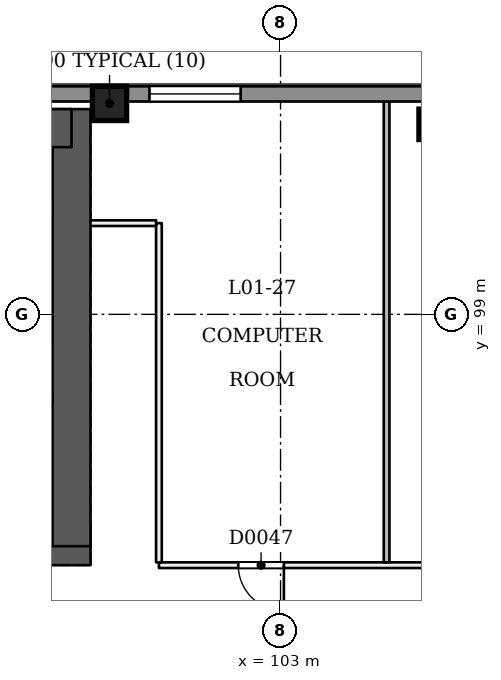
"""IFC4 building model, lengths in metres.
Left out: names, types, materials, properties, quantities, classifications, styles, units other than length and angle.
Written with IfcOpenShell. Run it as: python <this file> out.ifc"""

import sys

from ifc_helpers import new_model, si_unit, direction, frame, frame_2d, origin, origin_2d, place, context, subcontext, project, spatial, rectangle, extrude, element, fill, save


model = new_model("IFC4")
c1 = context("Model", 3, precision=1e-05, world=origin(), true_north=direction((0.0, 1.0)))
c2 = subcontext(c1, "Body", "Model", "MODEL_VIEW")
j1 = project(units=[si_unit("LENGTHUNIT", "METRE"), si_unit("PLANEANGLEUNIT", "RADIAN")], contexts=[c1])
p1 = place(None, origin())
s1 = spatial("IfcSite", under=j1, at=p1, CompositionType="ELEMENT")
p2 = place(p1, origin())
s2 = spatial("IfcBuilding", under=s1, at=p2, CompositionType="ELEMENT")
p3 = place(p2, frame((0.0, 0.0, 9.0)))
s3 = spatial("IfcBuildingStorey", under=s2, at=p3, CompositionType="ELEMENT", Elevation=9.0)
p4 = place(p3, frame((72.5, 92.9, 0.0), z_axis=(0.0, 0.0, 1.0), x_axis=(1.0, 0.0, 0.0)))
e1 = element("IfcWall", 1, at=p4, inside=s3, PredefinedType="SHEAR", context=c2, shape_type="SweptSolid", body=[
    extrude(rectangle(XDim=25.5, YDim=1.0, at=frame_2d((12.75, 0.0))), origin(), (0.0, 0.0, 1.0), 4.5),
])
p5 = place(p4, frame((1.3, 0.0, 0.0)))
e2 = element("IfcOpeningElement", 2, at=p5, cuts=e1, PredefinedType="OPENING", context=c2, shape_type="SweptSolid", body=[
    extrude(rectangle(XDim=1.2, YDim=2.1, at=frame_2d((0.6, 1.05))), frame((0.0, 0.51, 0.0), z_axis=(0.0, -1.0, 0.0), x_axis=(1.0, 0.0, 0.0)), (0.0, 0.0, 1.0), 1.021),
])
p6 = place(p4, frame((3.5, 0.0, 0.0)))
e3 = element("IfcOpeningElement", 3, at=p6, cuts=e1, PredefinedType="OPENING", context=c2, shape_type="SweptSolid", body=[
    extrude(rectangle(XDim=1.2, YDim=2.1, at=frame_2d((0.6, 1.05))), frame((0.0, 0.51, 0.0), z_axis=(0.0, -1.0, 0.0), x_axis=(1.0, 0.0, 0.0)), (0.0, 0.0, 1.0), 1.021),
])
p7 = place(p4, frame((13.5, 0.0, 0.0)))
e4 = element("IfcOpeningElement", 4, at=p7, cuts=e1, PredefinedType="OPENING", context=c2, shape_type="SweptSolid", body=[
    extrude(rectangle(XDim=1.2, YDim=2.1, at=frame_2d((0.6, 1.05))), frame((0.0, 0.51, 0.0), z_axis=(0.0, -1.0, 0.0), x_axis=(1.0, 0.0, 0.0)), (0.0, 0.0, 1.0), 1.021),
])
p8 = place(p4, frame((16.163, 0.0, 0.0)))
e5 = element("IfcOpeningElement", 5, at=p8, cuts=e1, PredefinedType="OPENING", context=c2, shape_type="SweptSolid", body=[
    extrude(rectangle(XDim=1.0, YDim=2.1, at=frame_2d((0.5, 1.05))), frame((0.0, 0.51, 0.0), z_axis=(0.0, -1.0, 0.0), x_axis=(1.0, 0.0, 0.0)), (0.0, 0.0, 1.0), 1.021),
])
p9 = place(p4, frame((18.95, 0.0, 0.0)))
e6 = element("IfcOpeningElement", 6, at=p9, cuts=e1, PredefinedType="OPENING", context=c2, shape_type="SweptSolid", body=[
    extrude(rectangle(XDim=1.0, YDim=2.1, at=frame_2d((0.5, 1.05))), frame((0.0, 0.51, 0.0), z_axis=(0.0, -1.0, 0.0), x_axis=(1.0, 0.0, 0.0)), (0.0, 0.0, 1.0), 1.021),
])
p10 = place(p4, frame((22.137, 0.0, 0.0)))
e7 = element("IfcOpeningElement", 7, at=p10, cuts=e1, PredefinedType="OPENING", context=c2, shape_type="SweptSolid", body=[
    extrude(rectangle(XDim=1.0, YDim=2.1, at=frame_2d((0.5, 1.05))), frame((0.0, 0.51, 0.0), z_axis=(0.0, -1.0, 0.0), x_axis=(1.0, 0.0, 0.0)), (0.0, 0.0, 1.0), 1.021),
])
p11 = place(p3, frame((97.5, 92.9, 0.0), z_axis=(0.0, 0.0, 1.0), x_axis=(0.0, 1.0, 0.0)))
e8 = element("IfcWall", 8, at=p11, inside=s3, PredefinedType="SHEAR", context=c2, shape_type="SweptSolid", body=[
    extrude(rectangle(XDim=11.5, YDim=1.0, at=frame_2d((5.75, 0.0))), origin(), (0.0, 0.0, 1.0), 4.5),
])
p12 = place(p3, frame((97.5, 103.9, 0.0), z_axis=(0.0, 0.0, 1.0), x_axis=(-1.0, 0.0, 0.0)))
e9 = element("IfcWall", 9, at=p12, inside=s3, PredefinedType="SHEAR", context=c2, shape_type="SweptSolid", body=[
    extrude(rectangle(XDim=25.5, YDim=1.0, at=frame_2d((12.75, 0.0))), origin(), (0.0, 0.0, 1.0), 4.5),
])
p13 = place(p3, frame((98.5, 104.55, 0.0), z_axis=(0.0, 0.0, 1.0), x_axis=(1.0, 0.0, 0.0)))
e10 = element("IfcColumn", 10, at=p13, inside=s3, PredefinedType="COLUMN", context=c2, shape_type="SweptSolid", body=[
    extrude(rectangle(XDim=0.9, YDim=0.9, at=origin_2d()), origin(), (0.0, 0.0, 1.0), 4.5),
])
p14 = place(p3, frame((107.041, 104.0, 0.0), z_axis=(0.0, 0.0, 1.0), x_axis=(1.0, 0.0, 0.0)))
e11 = element("IfcColumn", 11, at=p14, inside=s3, PredefinedType="COLUMN", context=c2, shape_type="SweptSolid", body=[
    extrude(rectangle(XDim=0.8, YDim=0.8, at=origin_2d()), origin(), (0.0, 0.0, 1.0), 4.5),
])
p15 = place(p3, frame((86.747, 47.526, 0.0), z_axis=(0.0, 0.0, 1.0), x_axis=(0.500000085768, 0.866025354266, 0.0)))
e12 = element("IfcWall", 12, at=p15, inside=s3, PredefinedType="PARTITIONING", context=c2, shape_type="SweptSolid", body=[
    extrude(rectangle(XDim=55.365, YDim=0.15, at=frame_2d((27.682, 0.0))), origin(), (0.0, 0.0, 1.0), 4.05),
])
p16 = place(p15, frame((0.97, 0.0, 0.0)))
e13 = element("IfcOpeningElement", 13, at=p16, cuts=e12, PredefinedType="OPENING", context=c2, shape_type="SweptSolid", body=[
    extrude(rectangle(XDim=1.2, YDim=2.1, at=frame_2d((0.6, 1.05))), frame((0.0, 0.085, 0.0), z_axis=(0.0, -1.0, 0.0), x_axis=(1.0, 0.0, 0.0)), (0.0, 0.0, 1.0), 0.171),
])
p17 = place(p15, frame((9.082, 0.0, 0.0)))
e14 = element("IfcOpeningElement", 14, at=p17, cuts=e12, PredefinedType="OPENING", context=c2, shape_type="SweptSolid", body=[
    extrude(rectangle(XDim=1.2, YDim=2.1, at=frame_2d((0.6, 1.05))), frame((0.0, 0.085, 0.0), z_axis=(0.0, -1.0, 0.0), x_axis=(1.0, 0.0, 0.0)), (0.0, 0.0, 1.0), 0.171),
])
p18 = place(p15, frame((18.082, 0.0, 0.0)))
e15 = element("IfcOpeningElement", 15, at=p18, cuts=e12, PredefinedType="OPENING", context=c2, shape_type="SweptSolid", body=[
    extrude(rectangle(XDim=1.2, YDim=2.1, at=frame_2d((0.6, 1.05))), frame((0.0, 0.085, 0.0), z_axis=(0.0, -1.0, 0.0), x_axis=(1.0, 0.0, 0.0)), (0.0, 0.0, 1.0), 0.171),
])
p19 = place(p15, frame((23.613, 0.0, 0.0)))
e16 = element("IfcOpeningElement", 16, at=p19, cuts=e12, PredefinedType="OPENING", context=c2, shape_type="SweptSolid", body=[
    extrude(rectangle(XDim=1.0, YDim=2.1, at=frame_2d((0.5, 1.05))), frame((0.0, 0.085, 0.0), z_axis=(0.0, -1.0, 0.0), x_axis=(1.0, 0.0, 0.0)), (0.0, 0.0, 1.0), 0.171),
])
p20 = place(p15, frame((26.363, 0.0, 0.0)))
e17 = element("IfcOpeningElement", 17, at=p20, cuts=e12, PredefinedType="OPENING", context=c2, shape_type="SweptSolid", body=[
    extrude(rectangle(XDim=1.0, YDim=2.1, at=frame_2d((0.5, 1.05))), frame((0.0, 0.085, 0.0), z_axis=(0.0, -1.0, 0.0), x_axis=(1.0, 0.0, 0.0)), (0.0, 0.0, 1.0), 0.171),
])
p21 = place(p15, frame((33.032, 0.0, 0.0)))
e18 = element("IfcOpeningElement", 18, at=p21, cuts=e12, PredefinedType="OPENING", context=c2, shape_type="SweptSolid", body=[
    extrude(rectangle(XDim=1.2, YDim=2.1, at=frame_2d((0.6, 1.05))), frame((0.0, 0.085, 0.0), z_axis=(0.0, -1.0, 0.0), x_axis=(1.0, 0.0, 0.0)), (0.0, 0.0, 1.0), 0.171),
])
p22 = place(p15, frame((47.337, 0.0, 0.0)))
e19 = element("IfcOpeningElement", 19, at=p22, cuts=e12, PredefinedType="OPENING", context=c2, shape_type="SweptSolid", body=[
    extrude(rectangle(XDim=1.2, YDim=2.1, at=frame_2d((0.6, 1.05))), frame((0.0, 0.085, 0.0), z_axis=(0.0, -1.0, 0.0), x_axis=(1.0, 0.0, 0.0)), (0.0, 0.0, 1.0), 0.171),
])
p23 = place(p3, frame((109.884, 92.4, 0.0), z_axis=(0.0, 0.0, 1.0), x_axis=(-1.0, 0.0, 0.0)))
e20 = element("IfcWall", 20, at=p23, inside=s3, PredefinedType="PARTITIONING", context=c2, shape_type="SweptSolid", body=[
    extrude(rectangle(XDim=10.084, YDim=0.15, at=frame_2d((5.042, 0.0))), origin(), (0.0, 0.0, 1.0), 4.05),
])
p24 = place(p23, frame((0.223, 0.0, 0.0)))
e21 = element("IfcOpeningElement", 21, at=p24, cuts=e20, PredefinedType="OPENING", context=c2, shape_type="SweptSolid", body=[
    extrude(rectangle(XDim=1.2, YDim=2.1, at=frame_2d((0.6, 1.05))), frame((0.0, 0.085, 0.0), z_axis=(0.0, -1.0, 0.0), x_axis=(1.0, 0.0, 0.0)), (0.0, 0.0, 1.0), 0.171),
])
p25 = place(p23, frame((6.796, 0.0, 0.0)))
e22 = element("IfcOpeningElement", 22, at=p25, cuts=e20, PredefinedType="OPENING", context=c2, shape_type="SweptSolid", body=[
    extrude(rectangle(XDim=1.2, YDim=2.1, at=frame_2d((0.6, 1.05))), frame((0.0, 0.085, 0.0), z_axis=(0.0, -1.0, 0.0), x_axis=(1.0, 0.0, 0.0)), (0.0, 0.0, 1.0), 0.171),
])
p26 = place(p3, frame((99.8, 92.475, 0.0), z_axis=(0.0, 0.0, 1.0), x_axis=(0.0, 1.0, 0.0)))
e23 = element("IfcWall", 23, at=p26, inside=s3, PredefinedType="PARTITIONING", context=c2, shape_type="SweptSolid", body=[
    extrude(rectangle(XDim=8.925, YDim=0.15, at=frame_2d((4.462, 0.0))), origin(), (0.0, 0.0, 1.0), 4.05),
])
p27 = place(p3, frame((99.725, 101.4, 0.0), z_axis=(0.0, 0.0, 1.0), x_axis=(-1.0, 0.0, 0.0)))
e24 = element("IfcWall", 24, at=p27, inside=s3, PredefinedType="PARTITIONING", context=c2, shape_type="SweptSolid", body=[
    extrude(rectangle(XDim=1.725, YDim=0.15, at=frame_2d((0.863, 0.0))), origin(), (0.0, 0.0, 1.0), 4.05),
])
p28 = place(p3, frame((105.791, 104.9, 0.0), z_axis=(0.0, 0.0, 1.0), x_axis=(0.0, -1.0, 0.0)))
e25 = element("IfcWall", 25, at=p28, inside=s3, PredefinedType="PARTITIONING", context=c2, shape_type="SweptSolid", body=[
    extrude(rectangle(XDim=12.425, YDim=0.15, at=frame_2d((6.212, 0.0))), origin(), (0.0, 0.0, 1.0), 4.05),
])
p29 = place(p3, frame((53.565, 104.8, 0.0), z_axis=(0.0, 0.0, 1.0), x_axis=(1.0, 0.0, 0.0)))
e26 = element("IfcWall", 26, at=p29, inside=s3, PredefinedType="SOLIDWALL", context=c2, shape_type="SweptSolid", body=[
    extrude(rectangle(XDim=62.871, YDim=0.4, at=frame_2d((31.435, 0.0))), origin(), (0.0, 0.0, 1.0), 4.05),
])
p30 = place(p29, frame((59.452, 0.0, 0.9)))
e27 = element("IfcOpeningElement", 27, at=p30, cuts=e26, PredefinedType="OPENING", context=c2, shape_type="SweptSolid", body=[
    extrude(rectangle(XDim=2.4, YDim=1.5, at=frame_2d((1.2, 0.75))), frame((0.0, 0.21, 0.0), z_axis=(0.0, -1.0, 0.0), x_axis=(1.0, 0.0, 0.0)), (0.0, 0.0, 1.0), 0.421),
])
p31 = place(p29, frame((54.986, 0.0, 0.9)))
e28 = element("IfcOpeningElement", 28, at=p31, cuts=e26, PredefinedType="OPENING", context=c2, shape_type="SweptSolid", body=[
    extrude(rectangle(XDim=2.4, YDim=1.5, at=frame_2d((1.2, 0.75))), frame((0.0, 0.21, 0.0), z_axis=(0.0, -1.0, 0.0), x_axis=(1.0, 0.0, 0.0)), (0.0, 0.0, 1.0), 0.421),
])
p32 = place(p29, frame((45.986, 0.0, 0.9)))
e29 = element("IfcOpeningElement", 29, at=p32, cuts=e26, PredefinedType="OPENING", context=c2, shape_type="SweptSolid", body=[
    extrude(rectangle(XDim=2.4, YDim=1.5, at=frame_2d((1.2, 0.75))), frame((0.0, 0.21, 0.0), z_axis=(0.0, -1.0, 0.0), x_axis=(1.0, 0.0, 0.0)), (0.0, 0.0, 1.0), 0.421),
])
p33 = place(p29, frame((14.486, 0.0, 0.9)))
e30 = element("IfcOpeningElement", 30, at=p33, cuts=e26, PredefinedType="OPENING", context=c2, shape_type="SweptSolid", body=[
    extrude(rectangle(XDim=2.4, YDim=1.5, at=frame_2d((1.2, 0.75))), frame((0.0, 0.21, 0.0), z_axis=(0.0, -1.0, 0.0), x_axis=(1.0, 0.0, 0.0)), (0.0, 0.0, 1.0), 0.421),
])
p34 = place(p29, frame((1.018, 0.0, 0.9)))
e31 = element("IfcOpeningElement", 31, at=p34, cuts=e26, PredefinedType="OPENING", context=c2, shape_type="SweptSolid", body=[
    extrude(rectangle(XDim=2.4, YDim=1.5, at=frame_2d((1.2, 0.75))), frame((0.0, 0.21, 0.0), z_axis=(0.0, -1.0, 0.0), x_axis=(1.0, 0.0, 0.0)), (0.0, 0.0, 1.0), 0.421),
])
p35 = place(p3, frame((121.762, 95.574, 0.0), z_axis=(0.0, 0.0, 1.0), x_axis=(-0.499997306052, -0.866026959131, 0.0)))
e32 = element("IfcWall", 32, at=p35, inside=s3, PredefinedType="SOLIDWALL", context=c2, shape_type="SweptSolid", body=[
    extrude(rectangle(XDim=62.87, YDim=0.4, at=frame_2d((31.435, 0.0))), origin(), (0.0, 0.0, 1.0), 4.05),
])
p36 = place(p35, frame((59.452, 0.0, 0.9)))
e33 = element("IfcOpeningElement", 33, at=p36, cuts=e32, PredefinedType="OPENING", context=c2, shape_type="SweptSolid", body=[
    extrude(rectangle(XDim=2.4, YDim=1.5, at=frame_2d((1.2, 0.75))), frame((0.0, 0.21, 0.0), z_axis=(0.0, -1.0, 0.0), x_axis=(1.0, 0.0, 0.0)), (0.0, 0.0, 1.0), 0.421),
])
p37 = place(p35, frame((54.986, 0.0, 0.9)))
e34 = element("IfcOpeningElement", 34, at=p37, cuts=e32, PredefinedType="OPENING", context=c2, shape_type="SweptSolid", body=[
    extrude(rectangle(XDim=2.4, YDim=1.5, at=frame_2d((1.2, 0.75))), frame((0.0, 0.21, 0.0), z_axis=(0.0, -1.0, 0.0), x_axis=(1.0, 0.0, 0.0)), (0.0, 0.0, 1.0), 0.421),
])
p38 = place(p35, frame((50.486, 0.0, 0.9)))
e35 = element("IfcOpeningElement", 35, at=p38, cuts=e32, PredefinedType="OPENING", context=c2, shape_type="SweptSolid", body=[
    extrude(rectangle(XDim=2.4, YDim=1.5, at=frame_2d((1.2, 0.75))), frame((0.0, 0.21, 0.0), z_axis=(0.0, -1.0, 0.0), x_axis=(1.0, 0.0, 0.0)), (0.0, 0.0, 1.0), 0.421),
])
p39 = place(p35, frame((45.986, 0.0, 0.9)))
e36 = element("IfcOpeningElement", 36, at=p39, cuts=e32, PredefinedType="OPENING", context=c2, shape_type="SweptSolid", body=[
    extrude(rectangle(XDim=2.4, YDim=1.5, at=frame_2d((1.2, 0.75))), frame((0.0, 0.21, 0.0), z_axis=(0.0, -1.0, 0.0), x_axis=(1.0, 0.0, 0.0)), (0.0, 0.0, 1.0), 0.421),
])
p40 = place(p35, frame((41.486, 0.0, 0.9)))
e37 = element("IfcOpeningElement", 37, at=p40, cuts=e32, PredefinedType="OPENING", context=c2, shape_type="SweptSolid", body=[
    extrude(rectangle(XDim=2.4, YDim=1.5, at=frame_2d((1.2, 0.75))), frame((0.0, 0.21, 0.0), z_axis=(0.0, -1.0, 0.0), x_axis=(1.0, 0.0, 0.0)), (0.0, 0.0, 1.0), 0.421),
])
p41 = place(p35, frame((36.986, 0.0, 0.9)))
e38 = element("IfcOpeningElement", 38, at=p41, cuts=e32, PredefinedType="OPENING", context=c2, shape_type="SweptSolid", body=[
    extrude(rectangle(XDim=2.4, YDim=1.5, at=frame_2d((1.2, 0.75))), frame((0.0, 0.21, 0.0), z_axis=(0.0, -1.0, 0.0), x_axis=(1.0, 0.0, 0.0)), (0.0, 0.0, 1.0), 0.421),
])
p42 = place(p35, frame((23.486, 0.0, 0.9)))
e39 = element("IfcOpeningElement", 39, at=p42, cuts=e32, PredefinedType="OPENING", context=c2, shape_type="SweptSolid", body=[
    extrude(rectangle(XDim=2.4, YDim=1.5, at=frame_2d((1.2, 0.75))), frame((0.0, 0.21, 0.0), z_axis=(0.0, -1.0, 0.0), x_axis=(1.0, 0.0, 0.0)), (0.0, 0.0, 1.0), 0.421),
])
p43 = place(p35, frame((18.986, 0.0, 0.9)))
e40 = element("IfcOpeningElement", 40, at=p43, cuts=e32, PredefinedType="OPENING", context=c2, shape_type="SweptSolid", body=[
    extrude(rectangle(XDim=2.4, YDim=1.5, at=frame_2d((1.2, 0.75))), frame((0.0, 0.21, 0.0), z_axis=(0.0, -1.0, 0.0), x_axis=(1.0, 0.0, 0.0)), (0.0, 0.0, 1.0), 0.421),
])
p44 = place(p35, frame((14.486, 0.0, 0.9)))
e41 = element("IfcOpeningElement", 41, at=p44, cuts=e32, PredefinedType="OPENING", context=c2, shape_type="SweptSolid", body=[
    extrude(rectangle(XDim=2.4, YDim=1.5, at=frame_2d((1.2, 0.75))), frame((0.0, 0.21, 0.0), z_axis=(0.0, -1.0, 0.0), x_axis=(1.0, 0.0, 0.0)), (0.0, 0.0, 1.0), 0.421),
])
p45 = place(p35, frame((5.486, 0.0, 0.9)))
e42 = element("IfcOpeningElement", 42, at=p45, cuts=e32, PredefinedType="OPENING", context=c2, shape_type="SweptSolid", body=[
    extrude(rectangle(XDim=2.4, YDim=1.5, at=frame_2d((1.2, 0.75))), frame((0.0, 0.21, 0.0), z_axis=(0.0, -1.0, 0.0), x_axis=(1.0, 0.0, 0.0)), (0.0, 0.0, 1.0), 0.421),
])
p46 = place(p35, frame((1.018, 0.0, 0.9)))
e43 = element("IfcOpeningElement", 43, at=p46, cuts=e32, PredefinedType="OPENING", context=c2, shape_type="SweptSolid", body=[
    extrude(rectangle(XDim=2.4, YDim=1.5, at=frame_2d((1.2, 0.75))), frame((0.0, 0.21, 0.0), z_axis=(0.0, -1.0, 0.0), x_axis=(1.0, 0.0, 0.0)), (0.0, 0.0, 1.0), 0.421),
])
p47 = place(p25, origin())
e44 = element("IfcDoor", 44, at=p47, inside=s3, OperationType="SINGLE_SWING_LEFT", PredefinedType="NOTDEFINED", context=c2, shape_type="SweptSolid", body=[
    extrude(rectangle(XDim=1.2, YDim=2.1, at=frame_2d((0.6, 1.05))), frame((0.0, 0.025, 0.0), z_axis=(0.0, -1.0, 0.0), x_axis=(1.0, 0.0, 0.0)), (0.0, 0.0, 1.0), 0.05),
])
fill(e22, e44)
p48 = place(p32, origin())
e45 = element("IfcWindow", 45, at=p48, inside=s3, PartitioningType="SINGLE_PANEL", PredefinedType="WINDOW", context=c2, shape_type="SweptSolid", body=[
    extrude(rectangle(XDim=2.4, YDim=1.5, at=frame_2d((1.2, 0.75))), frame((0.0, 0.03, 0.0), z_axis=(0.0, -1.0, 0.0), x_axis=(1.0, 0.0, 0.0)), (0.0, 0.0, 1.0), 0.06),
])
fill(e29, e45)
save(model, sys.argv[1])
